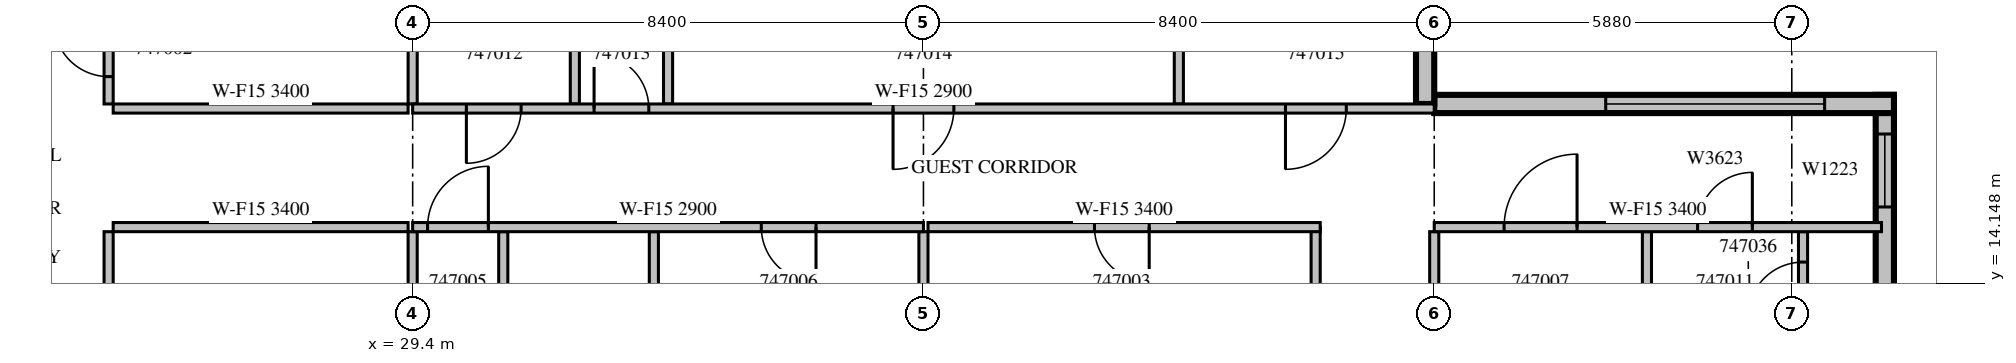
"""IFC4 building model, lengths in metres.
Left out: names, types, materials, properties, quantities, classifications, styles, units other than length and angle.
Written with IfcOpenShell. Run it as: python <this file> out.ifc"""

import sys

from ifc_helpers import new_model, si_unit, direction, frame, frame_2d, origin, place, context, subcontext, project, spatial, rectangle, extrude, source, transform, mapped, element, fill, save


model = new_model("IFC4")
c1 = context("Model", 3, precision=1e-05, world=origin(), true_north=direction((0.0, 1.0)))
c2 = subcontext(c1, "Body", "Model", "MODEL_VIEW")
j1 = project(units=[si_unit("LENGTHUNIT", "METRE"), si_unit("PLANEANGLEUNIT", "RADIAN")], contexts=[c1])
p1 = place(None, origin())
s1 = spatial("IfcSite", under=j1, at=p1, CompositionType="ELEMENT")
p2 = place(p1, origin())
s2 = spatial("IfcBuilding", under=s1, at=p2, CompositionType="ELEMENT")
p3 = place(p2, frame((0.0, 0.0, 212.0)))
s3 = spatial("IfcBuildingStorey", under=s2, at=p3, CompositionType="ELEMENT", Elevation=212.0)
m1 = source(origin(), c2, "Body", "SweptSolid", [
    extrude(rectangle(XDim=3.375, YDim=0.3, at=frame_2d((1.688, 0.0))), origin(), (0.0, 0.0, 1.0), 3.4),
])
p4 = place(p3, frame((53.61, 13.875, 0.0), z_axis=(0.0, 0.0, 1.0), x_axis=(0.0, 1.0, 0.0)))
e1 = element("IfcWall", 1, at=p4, inside=s3, PredefinedType="STANDARD", context=c2, shape_type="MappedRepresentation", body=[
    mapped(m1, transform((0.0, 0.0, 0.0), scale=1.0)),
])
m2 = source(origin(), c2, "Body", "SweptSolid", [
    extrude(rectangle(XDim=1.2, YDim=2.3, at=frame_2d((0.6, 1.15))), frame((0.0, 0.16, 0.0), z_axis=(0.0, -1.0, 0.0), x_axis=(1.0, 0.0, 0.0)), (0.0, 0.0, 1.0), 0.32),
])
p5 = place(p4, frame((1.531, 0.0, 0.6)))
e2 = element("IfcOpeningElement", 2, at=p5, cuts=e1, PredefinedType="OPENING", context=c2, shape_type="MappedRepresentation", body=[
    mapped(m2, transform((0.0, 0.0, 0.0), scale=1.0)),
])
m3 = source(origin(), c2, "Body", "SweptSolid", [
    extrude(rectangle(XDim=7.56, YDim=0.3, at=frame_2d((3.78, 0.0))), origin(), (0.0, 0.0, 1.0), 3.4),
])
p6 = place(p3, frame((53.76, 17.1, 0.0), z_axis=(0.0, 0.0, 1.0), x_axis=(-1.0, 0.0, 0.0)))
e3 = element("IfcWall", 3, at=p6, inside=s3, PredefinedType="STANDARD", context=c2, shape_type="MappedRepresentation", body=[
    mapped(m3, transform((0.0, 0.0, 0.0), scale=1.0)),
])
m4 = source(origin(), c2, "Body", "SweptSolid", [
    extrude(rectangle(XDim=3.6, YDim=2.3, at=frame_2d((1.8, 1.15))), frame((0.0, 0.16, 0.0), z_axis=(0.0, -1.0, 0.0), x_axis=(1.0, 0.0, 0.0)), (0.0, 0.0, 1.0), 0.32),
])
p7 = place(p6, frame((1.14, 0.0, 0.6)))
e4 = element("IfcOpeningElement", 4, at=p7, cuts=e3, PredefinedType="OPENING", context=c2, shape_type="MappedRepresentation", body=[
    mapped(m4, transform((0.0, 0.0, 0.0), scale=1.0)),
])
m5 = source(origin(), c2, "Body", "SweptSolid", [
    extrude(rectangle(XDim=3.0, YDim=0.3, at=frame_2d((1.5, 0.0))), origin(), (0.0, 0.0, 1.0), 3.4),
])
p8 = place(p3, frame((46.05, 17.1, 0.0), z_axis=(0.0, 0.0, 1.0), x_axis=(0.0, 1.0, 0.0)))
e5 = element("IfcWall", 5, at=p8, inside=s3, PredefinedType="STANDARD", context=c2, shape_type="MappedRepresentation", body=[
    mapped(m5, transform((0.0, 0.0, 0.0), scale=1.0)),
])
p9 = place(p8, frame((1.425, 0.0, 0.6)))
e6 = element("IfcOpeningElement", 6, at=p9, cuts=e5, PredefinedType="OPENING", context=c2, shape_type="MappedRepresentation", body=[
    mapped(m2, transform((0.0, 0.0, 0.0), scale=1.0)),
])
m6 = source(origin(), c2, "Body", "SweptSolid", [
    extrude(rectangle(XDim=4.295, YDim=0.15, at=frame_2d((2.147, 0.0))), origin(), (0.0, 0.0, 1.0), 3.4),
])
p10 = place(p3, frame((24.4, 15.0, 0.0), z_axis=(0.0, 0.0, 1.0), x_axis=(0.0, -1.0, 0.0)))
e7 = element("IfcWall", 7, at=p10, inside=s3, PredefinedType="PARTITIONING", context=c2, shape_type="MappedRepresentation", body=[
    mapped(m6, transform((0.0, 0.0, 0.0), scale=1.0)),
])
m7 = source(origin(), c2, "Body", "SweptSolid", [
    extrude(rectangle(XDim=0.9, YDim=2.1, at=frame_2d((0.45, 1.05))), frame((0.0, 0.085, 0.0), z_axis=(0.0, -1.0, 0.0), x_axis=(1.0, 0.0, 0.0)), (0.0, 0.0, 1.0), 0.17),
])
p11 = place(p10, frame((1.113, 0.0, 0.0)))
e8 = element("IfcOpeningElement", 8, at=p11, cuts=e7, PredefinedType="OPENING", context=c2, shape_type="MappedRepresentation", body=[
    mapped(m7, transform((0.0, 0.0, 0.0), scale=1.0)),
])
m8 = source(origin(), c2, "Body", "SweptSolid", [
    extrude(rectangle(XDim=3.6, YDim=0.15, at=frame_2d((1.8, 0.0))), origin(), (0.0, 0.0, 1.0), 3.4),
])
p12 = place(p3, frame((24.4, 20.7, 0.0), z_axis=(0.0, 0.0, 1.0), x_axis=(0.0, -1.0, 0.0)))
e9 = element("IfcWall", 9, at=p12, inside=s3, PredefinedType="PARTITIONING", context=c2, shape_type="MappedRepresentation", body=[
    mapped(m8, transform((0.0, 0.0, 0.0), scale=1.0)),
])
p13 = place(p12, frame((2.25, 0.0, 0.0)))
e10 = element("IfcOpeningElement", 10, at=p13, cuts=e9, PredefinedType="OPENING", context=c2, shape_type="MappedRepresentation", body=[
    mapped(m7, transform((0.0, 0.0, 0.0), scale=1.0)),
])
m9 = source(origin(), c2, "Body", "SweptSolid", [
    extrude(rectangle(XDim=4.85, YDim=0.15, at=frame_2d((2.425, 0.0))), origin(), (0.0, 0.0, 1.0), 3.4),
])
for number, where, z_axis, x_axis in (
    (11, (29.325, 15.075, 0.0), (0.0, 0.0, 1.0), (-1.0, 0.0, 0.0)),
    (12, (24.475, 17.025, 0.0), (0.0, 0.0, 1.0), (1.0, 0.0, 0.0)),
):
    element("IfcWall", number, at=place(p3, frame(where, z_axis=z_axis, x_axis=x_axis)), inside=s3, PredefinedType="PARTITIONING", context=c2, shape_type="MappedRepresentation", body=[
        mapped(m9, transform((0.0, 0.0, 0.0), scale=1.0)),
    ])
m10 = source(origin(), c2, "Body", "SweptSolid", [
    extrude(rectangle(XDim=4.051, YDim=0.15, at=frame_2d((2.026, 0.0))), origin(), (0.0, 0.0, 1.0), 3.4),
])
p14 = place(p3, frame((29.4, 10.949, 0.0), z_axis=(0.0, 0.0, 1.0), x_axis=(0.0, 1.0, 0.0)))
e13 = element("IfcWall", 13, at=p14, inside=s3, PredefinedType="PARTITIONING", context=c2, shape_type="MappedRepresentation", body=[
    mapped(m10, transform((0.0, 0.0, 0.0), scale=1.0)),
])
m11 = source(origin(), c2, "Body", "SweptSolid", [
    extrude(rectangle(XDim=3.001, YDim=0.15, at=frame_2d((1.5, 0.0))), origin(), (0.0, 0.0, 1.0), 3.4),
])
p15 = place(p3, frame((29.4, 17.1, 0.0), z_axis=(0.0, 0.0, 1.0), x_axis=(0.0, 1.0, 0.0)))
e14 = element("IfcWall", 14, at=p15, inside=s3, PredefinedType="PARTITIONING", context=c2, shape_type="MappedRepresentation", body=[
    mapped(m11, transform((0.0, 0.0, 0.0), scale=1.0)),
])
m12 = source(origin(), c2, "Body", "SweptSolid", [
    extrude(rectangle(XDim=3.975, YDim=0.15, at=frame_2d((1.988, 0.0))), origin(), (0.0, 0.0, 1.0), 3.4),
])
p16 = place(p3, frame((44.25, 11.1, 0.0), z_axis=(0.0, 0.0, 1.0), x_axis=(0.0, 1.0, 0.0)))
e15 = element("IfcWall", 15, at=p16, inside=s3, PredefinedType="PARTITIONING", context=c2, shape_type="MappedRepresentation", body=[
    mapped(m12, transform((0.0, 0.0, 0.0), scale=1.0)),
])
m13 = source(origin(), c2, "Body", "SweptSolid", [
    extrude(rectangle(XDim=6.45, YDim=0.15, at=frame_2d((3.225, 0.0))), origin(), (0.0, 0.0, 1.0), 3.4),
])
p17 = place(p3, frame((44.325, 15.075, 0.0), z_axis=(0.0, 0.0, 1.0), x_axis=(-1.0, 0.0, 0.0)))
e16 = element("IfcWall", 16, at=p17, inside=s3, PredefinedType="PARTITIONING", context=c2, shape_type="MappedRepresentation", body=[
    mapped(m13, transform((0.0, 0.0, 0.0), scale=1.0)),
])
p18 = place(p17, frame((2.812, 0.0, 0.0)))
e17 = element("IfcOpeningElement", 17, at=p18, cuts=e16, PredefinedType="OPENING", context=c2, shape_type="MappedRepresentation", body=[
    mapped(m7, transform((0.0, 0.0, 0.0), scale=1.0)),
])
p19 = place(p3, frame((30.89, 10.705, 0.0), z_axis=(0.0, 0.0, 1.0), x_axis=(0.0, 1.0, 0.0)))
e18 = element("IfcWall", 18, at=p19, inside=s3, PredefinedType="PARTITIONING", context=c2, shape_type="MappedRepresentation", body=[
    mapped(m6, transform((0.0, 0.0, 0.0), scale=1.0)),
])
p20 = place(p19, frame((1.698, 0.0, 0.0)))
e19 = element("IfcOpeningElement", 19, at=p20, cuts=e18, PredefinedType="OPENING", context=c2, shape_type="MappedRepresentation", body=[
    mapped(m7, transform((0.0, 0.0, 0.0), scale=1.0)),
])
p21 = place(p3, frame((33.367, 10.705, 0.0), z_axis=(0.0, 0.0, 1.0), x_axis=(0.0, 1.0, 0.0)))
e20 = element("IfcWall", 20, at=p21, inside=s3, PredefinedType="PARTITIONING", context=c2, shape_type="MappedRepresentation", body=[
    mapped(m6, transform((0.0, 0.0, 0.0), scale=1.0)),
])
p22 = place(p3, frame((37.8, 10.949, 0.0), z_axis=(0.0, 0.0, 1.0), x_axis=(0.0, 1.0, 0.0)))
e21 = element("IfcWall", 21, at=p22, inside=s3, PredefinedType="PARTITIONING", context=c2, shape_type="MappedRepresentation", body=[
    mapped(m10, transform((0.0, 0.0, 0.0), scale=1.0)),
])
m14 = source(origin(), c2, "Body", "SweptSolid", [
    extrude(rectangle(XDim=3.9, YDim=0.15, at=frame_2d((1.95, 0.0))), origin(), (0.0, 0.0, 1.0), 3.4),
])
p23 = place(p3, frame((49.698, 11.1, 0.0), z_axis=(0.0, 0.0, 1.0), x_axis=(0.0, 1.0, 0.0)))
e22 = element("IfcWall", 22, at=p23, inside=s3, PredefinedType="PARTITIONING", context=c2, shape_type="MappedRepresentation", body=[
    mapped(m14, transform((0.0, 0.0, 0.0), scale=1.0)),
])
p24 = place(p3, frame((52.265, 11.1, 0.0), z_axis=(0.0, 0.0, 1.0), x_axis=(0.0, 1.0, 0.0)))
e23 = element("IfcWall", 23, at=p24, inside=s3, PredefinedType="PARTITIONING", context=c2, shape_type="MappedRepresentation", body=[
    mapped(m14, transform((0.0, 0.0, 0.0), scale=1.0)),
])
p25 = place(p24, frame((1.5, 0.0, 0.0)))
e24 = element("IfcOpeningElement", 24, at=p25, cuts=e23, PredefinedType="OPENING", context=c2, shape_type="MappedRepresentation", body=[
    mapped(m7, transform((0.0, 0.0, 0.0), scale=1.0)),
])
p26 = place(p24, frame((2.5, 0.0, 0.0)))
e25 = element("IfcOpeningElement", 25, at=p26, cuts=e23, PredefinedType="OPENING", context=c2, shape_type="MappedRepresentation", body=[
    mapped(m7, transform((0.0, 0.0, 0.0), scale=1.0)),
])
p27 = place(p24, frame((0.5, 0.0, 0.0)))
e26 = element("IfcOpeningElement", 26, at=p27, cuts=e23, PredefinedType="OPENING", context=c2, shape_type="MappedRepresentation", body=[
    mapped(m7, transform((0.0, 0.0, 0.0), scale=1.0)),
])
p28 = place(p3, frame((46.2, 11.1, 0.0), z_axis=(0.0, 0.0, 1.0), x_axis=(0.0, 1.0, 0.0)))
e27 = element("IfcWall", 27, at=p28, inside=s3, PredefinedType="PARTITIONING", context=c2, shape_type="MappedRepresentation", body=[
    mapped(m14, transform((0.0, 0.0, 0.0), scale=1.0)),
])
m15 = source(origin(), c2, "Body", "SweptSolid", [
    extrude(rectangle(XDim=3.6, YDim=0.15, at=frame_2d((1.8, 0.0))), origin(), (0.0, 0.0, 1.0), 2.4),
])
for number, where, z_axis, x_axis in (
    (28, (32.067, 20.7, 0.0), (0.0, 0.0, 1.0), (0.0, -1.0, 0.0)),
    (29, (33.6, 17.1, 0.0), (0.0, 0.0, 1.0), (0.0, 1.0, 0.0)),
):
    element("IfcWall", number, at=place(p3, frame(where, z_axis=z_axis, x_axis=x_axis)), inside=s3, PredefinedType="PARTITIONING", context=c2, shape_type="MappedRepresentation", body=[
        mapped(m15, transform((0.0, 0.0, 0.0), scale=1.0)),
    ])
p29 = place(p3, frame((42.0, 17.1, 0.0), z_axis=(0.0, 0.0, 1.0), x_axis=(0.0, 1.0, 0.0)))
e30 = element("IfcWall", 30, at=p29, inside=s3, PredefinedType="PARTITIONING", context=c2, shape_type="MappedRepresentation", body=[
    mapped(m8, transform((0.0, 0.0, 0.0), scale=1.0)),
])
m16 = source(origin(), c2, "Body", "SweptSolid", [
    extrude(rectangle(XDim=8.4, YDim=0.15, at=frame_2d((4.2, 0.0))), origin(), (0.0, 0.0, 1.0), 2.9),
])
p30 = place(p3, frame((37.8, 15.075, 0.0), z_axis=(0.0, 0.0, 1.0), x_axis=(-1.0, 0.0, 0.0)))
e31 = element("IfcWall", 31, at=p30, inside=s3, PredefinedType="PARTITIONING", context=c2, shape_type="MappedRepresentation", body=[
    mapped(m16, transform((0.0, 0.0, 0.0), scale=1.0)),
])
m17 = source(origin(), c2, "Body", "SweptSolid", [
    extrude(rectangle(XDim=1.0, YDim=2.1, at=frame_2d((0.5, 1.05))), frame((0.0, 0.085, 0.0), z_axis=(0.0, -1.0, 0.0), x_axis=(1.0, 0.0, 0.0)), (0.0, 0.0, 1.0), 0.17),
])
p31 = place(p30, frame((7.155, 0.0, 0.0)))
e32 = element("IfcOpeningElement", 32, at=p31, cuts=e31, PredefinedType="OPENING", context=c2, shape_type="MappedRepresentation", body=[
    mapped(m17, transform((0.0, 0.0, 0.0), scale=1.0)),
])
p32 = place(p30, frame((1.767, 0.0, 0.0)))
e33 = element("IfcOpeningElement", 33, at=p32, cuts=e31, PredefinedType="OPENING", context=c2, shape_type="MappedRepresentation", body=[
    mapped(m7, transform((0.0, 0.0, 0.0), scale=1.0)),
])
m18 = source(origin(), c2, "Body", "SweptSolid", [
    extrude(rectangle(XDim=7.355, YDim=0.15, at=frame_2d((3.678, 0.0))), origin(), (0.0, 0.0, 1.0), 3.4),
])
p33 = place(p3, frame((53.555, 15.075, 0.0), z_axis=(0.0, 0.0, 1.0), x_axis=(-1.0, 0.0, 0.0)))
e34 = element("IfcWall", 34, at=p33, inside=s3, PredefinedType="PARTITIONING", context=c2, shape_type="MappedRepresentation", body=[
    mapped(m18, transform((0.0, 0.0, 0.0), scale=1.0)),
])
m19 = source(origin(), c2, "Body", "SweptSolid", [
    extrude(rectangle(XDim=1.2, YDim=2.1, at=frame_2d((0.6, 1.05))), frame((0.0, 0.085, 0.0), z_axis=(0.0, -1.0, 0.0), x_axis=(1.0, 0.0, 0.0)), (0.0, 0.0, 1.0), 0.17),
])
p34 = place(p33, frame((5.006, 0.0, 0.0)))
e35 = element("IfcOpeningElement", 35, at=p34, cuts=e34, PredefinedType="OPENING", context=c2, shape_type="MappedRepresentation", body=[
    mapped(m19, transform((0.0, 0.0, 0.0), scale=1.0)),
])
p35 = place(p33, frame((2.124, 0.0, 0.0)))
e36 = element("IfcOpeningElement", 36, at=p35, cuts=e34, PredefinedType="OPENING", context=c2, shape_type="MappedRepresentation", body=[
    mapped(m7, transform((0.0, 0.0, 0.0), scale=1.0)),
])
p36 = place(p3, frame((29.4, 17.025, 0.0), z_axis=(0.0, 0.0, 1.0), x_axis=(1.0, 0.0, 0.0)))
e37 = element("IfcWall", 37, at=p36, inside=s3, PredefinedType="PARTITIONING", context=c2, shape_type="SweptSolid", body=[
    extrude(rectangle(XDim=16.8, YDim=0.15, at=frame_2d((8.4, 0.0))), origin(), (0.0, 0.0, 1.0), 2.9),
])
p37 = place(p36, frame((0.883, 0.0, 0.0)))
e38 = element("IfcOpeningElement", 38, at=p37, cuts=e37, PredefinedType="OPENING", context=c2, shape_type="MappedRepresentation", body=[
    mapped(m7, transform((0.0, 0.0, 0.0), scale=1.0)),
])
p38 = place(p36, frame((2.983, 0.0, 0.0)))
e39 = element("IfcOpeningElement", 39, at=p38, cuts=e37, PredefinedType="OPENING", context=c2, shape_type="MappedRepresentation", body=[
    mapped(m7, transform((0.0, 0.0, 0.0), scale=1.0)),
])
p39 = place(p36, frame((7.9, 0.0, 0.0)))
e40 = element("IfcOpeningElement", 40, at=p39, cuts=e37, PredefinedType="OPENING", context=c2, shape_type="MappedRepresentation", body=[
    mapped(m17, transform((0.0, 0.0, 0.0), scale=1.0)),
])
p40 = place(p36, frame((14.354, 0.0, 0.0)))
e41 = element("IfcOpeningElement", 41, at=p40, cuts=e37, PredefinedType="OPENING", context=c2, shape_type="MappedRepresentation", body=[
    mapped(m17, transform((0.0, 0.0, 0.0), scale=1.0)),
])
m20 = source(origin(), c2, "Body", "SweptSolid", [
    extrude(rectangle(XDim=1.2, YDim=2.3, at=frame_2d((0.6, 1.15))), frame((0.0, 0.03, 0.0), z_axis=(0.0, -1.0, 0.0), x_axis=(1.0, 0.0, 0.0)), (0.0, 0.0, 1.0), 0.06),
])
p41 = place(p5, origin())
e42 = element("IfcWindow", 42, at=p41, inside=s3, PartitioningType="SINGLE_PANEL", PredefinedType="WINDOW", context=c2, shape_type="MappedRepresentation", body=[
    mapped(m20, transform((0.0, 0.0, 0.0), scale=1.0)),
])
fill(e2, e42)
m21 = source(origin(), c2, "Body", "SweptSolid", [
    extrude(rectangle(XDim=3.6, YDim=2.3, at=frame_2d((1.8, 1.15))), frame((0.0, 0.03, 0.0), z_axis=(0.0, -1.0, 0.0), x_axis=(1.0, 0.0, 0.0)), (0.0, 0.0, 1.0), 0.06),
])
p42 = place(p7, origin())
e43 = element("IfcWindow", 43, at=p42, inside=s3, PartitioningType="SINGLE_PANEL", PredefinedType="WINDOW", context=c2, shape_type="MappedRepresentation", body=[
    mapped(m21, transform((0.0, 0.0, 0.0), scale=1.0)),
])
fill(e4, e43)
m22 = source(origin(), c2, "Body", "SweptSolid", [
    extrude(rectangle(XDim=0.9, YDim=2.1, at=frame_2d((0.45, 1.05))), frame((0.0, 0.025, 0.0), z_axis=(0.0, -1.0, 0.0), x_axis=(1.0, 0.0, 0.0)), (0.0, 0.0, 1.0), 0.05),
])
p43 = place(p13, origin())
e44 = element("IfcDoor", 44, at=p43, inside=s3, OperationType="SINGLE_SWING_RIGHT", PredefinedType="DOOR", context=c2, shape_type="MappedRepresentation", body=[
    mapped(m22, transform((0.0, 0.0, 0.0), scale=1.0)),
])
fill(e10, e44)
p44 = place(p18, origin())
e45 = element("IfcDoor", 45, at=p44, inside=s3, OperationType="SINGLE_SWING_LEFT", PredefinedType="DOOR", context=c2, shape_type="MappedRepresentation", body=[
    mapped(m22, transform((0.0, 0.0, 0.0), scale=1.0)),
])
fill(e17, e45)
m23 = source(origin(), c2, "Body", "SweptSolid", [
    extrude(rectangle(XDim=1.0, YDim=2.1, at=frame_2d((0.5, 1.05))), frame((0.0, 0.025, 0.0), z_axis=(0.0, -1.0, 0.0), x_axis=(1.0, 0.0, 0.0)), (0.0, 0.0, 1.0), 0.05),
])
p45 = place(p31, origin())
e46 = element("IfcDoor", 46, at=p45, inside=s3, OperationType="SINGLE_SWING_RIGHT", PredefinedType="DOOR", context=c2, shape_type="MappedRepresentation", body=[
    mapped(m23, transform((0.0, 0.0, 0.0), scale=1.0)),
])
fill(e32, e46)
p46 = place(p32, origin())
e47 = element("IfcDoor", 47, at=p46, inside=s3, OperationType="SINGLE_SWING_LEFT", PredefinedType="DOOR", context=c2, shape_type="MappedRepresentation", body=[
    mapped(m22, transform((0.0, 0.0, 0.0), scale=1.0)),
])
fill(e33, e47)
m24 = source(origin(), c2, "Body", "SweptSolid", [
    extrude(rectangle(XDim=1.2, YDim=2.1, at=frame_2d((0.6, 1.05))), frame((0.0, 0.025, 0.0), z_axis=(0.0, -1.0, 0.0), x_axis=(1.0, 0.0, 0.0)), (0.0, 0.0, 1.0), 0.05),
])
p47 = place(p34, origin())
e48 = element("IfcDoor", 48, at=p47, inside=s3, OperationType="SINGLE_SWING_RIGHT", PredefinedType="DOOR", context=c2, shape_type="MappedRepresentation", body=[
    mapped(m24, transform((0.0, 0.0, 0.0), scale=1.0)),
])
fill(e35, e48)
p48 = place(p35, origin())
e49 = element("IfcDoor", 49, at=p48, inside=s3, OperationType="SINGLE_SWING_RIGHT", PredefinedType="DOOR", context=c2, shape_type="MappedRepresentation", body=[
    mapped(m22, transform((0.0, 0.0, 0.0), scale=1.0)),
])
fill(e36, e49)
p49 = place(p37, origin())
e50 = element("IfcDoor", 50, at=p49, inside=s3, OperationType="SINGLE_SWING_RIGHT", PredefinedType="DOOR", context=c2, shape_type="MappedRepresentation", body=[
    mapped(m22, transform((0.0, 0.0, 0.0), scale=1.0)),
])
fill(e38, e50)
p50 = place(p38, origin())
e51 = element("IfcDoor", 51, at=p50, inside=s3, OperationType="SINGLE_SWING_LEFT", PredefinedType="DOOR", context=c2, shape_type="MappedRepresentation", body=[
    mapped(m22, transform((0.0, 0.0, 0.0), scale=1.0)),
])
fill(e39, e51)
p51 = place(p39, origin())
e52 = element("IfcDoor", 52, at=p51, inside=s3, OperationType="SINGLE_SWING_RIGHT", PredefinedType="DOOR", context=c2, shape_type="MappedRepresentation", body=[
    mapped(m23, transform((0.0, 0.0, 0.0), scale=1.0)),
])
fill(e40, e52)
p52 = place(p40, origin())
e53 = element("IfcDoor", 53, at=p52, inside=s3, OperationType="SINGLE_SWING_RIGHT", PredefinedType="DOOR", context=c2, shape_type="MappedRepresentation", body=[
    mapped(m23, transform((0.0, 0.0, 0.0), scale=1.0)),
])
fill(e41, e53)
p53 = place(p26, origin())
e54 = element("IfcDoor", 54, at=p53, inside=s3, OperationType="SINGLE_SWING_LEFT", PredefinedType="DOOR", context=c2, shape_type="MappedRepresentation", body=[
    mapped(m22, transform((0.0, 0.0, 0.0), scale=1.0)),
])
fill(e25, e54)
save(model, sys.argv[1])
